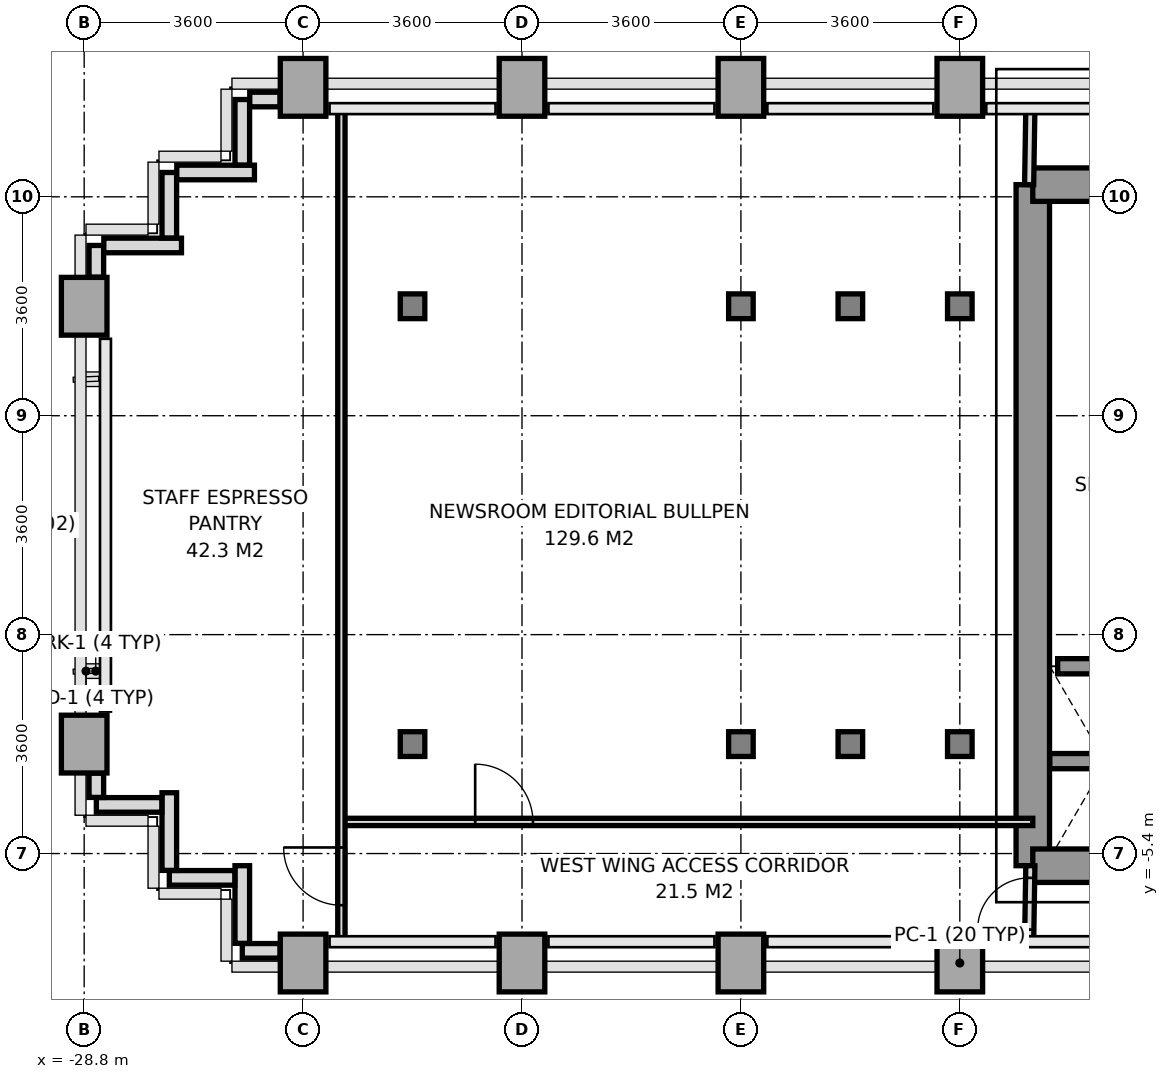
"""IFC4 building model, lengths in metres.
Left out: names, types, materials, properties, quantities, classifications, styles, units other than length and angle.
Written with IfcOpenShell. Run it as: python <this file> out.ifc"""

import sys

from ifc_helpers import new_model, si_unit, direction, frame, frame_2d, origin, origin_2d, place, context, subcontext, project, spatial, rectangle, i_section, extrude, source, transform, mapped, element, fill, save


model = new_model("IFC4")
c1 = context("Model", 3, precision=1e-05, world=origin(), true_north=direction((0.0, 1.0)))
c2 = subcontext(c1, "Body", "Model", "MODEL_VIEW")
j1 = project(units=[si_unit("LENGTHUNIT", "METRE"), si_unit("PLANEANGLEUNIT", "RADIAN")], contexts=[c1])
p1 = place(None, origin())
s1 = spatial("IfcSite", under=j1, at=p1, CompositionType="ELEMENT")
p2 = place(p1, origin())
s2 = spatial("IfcBuilding", under=s1, at=p2, CompositionType="ELEMENT")
p3 = place(p2, frame((0.0, 0.0, 37.4)))
s3 = spatial("IfcBuildingStorey", under=s2, at=p3, CompositionType="ELEMENT", Elevation=37.4)
m1 = source(origin(), c2, "Body", "SweptSolid", [
    extrude(rectangle(XDim=0.75, YDim=0.95, at=origin_2d()), origin(), (0.0, 0.0, 1.0), 3.2),
])
for number, where, z_axis, x_axis in (
    (1, (-28.8, -3.6, 0.0), (0.0, 0.0, 1.0), (1.0, 0.0, 0.0)),
    (2, (-28.8, 3.6, 0.0), (0.0, 0.0, 1.0), (1.0, 0.0, 0.0)),
    (3, (-25.2, -7.2, 0.0), (0.0, 0.0, 1.0), (1.0, 0.0, 0.0)),
    (4, (-25.2, 7.2, 0.0), (0.0, 0.0, 1.0), (1.0, 0.0, 0.0)),
):
    element("IfcColumn", number, at=place(p3, frame(where, z_axis=z_axis, x_axis=x_axis)), inside=s3, PredefinedType="COLUMN", context=c2, shape_type="MappedRepresentation", body=[
        mapped(m1, transform((0.0, 0.0, 0.0), x_axis=(1.0, 0.0, 0.0), y_axis=(0.0, 1.0, 0.0), z_axis=(0.0, 0.0, 1.0), scale=1.0)),
    ])
m2 = source(origin(), c2, "Body", "SweptSolid", [
    extrude(i_section(OverallWidth=0.404, OverallDepth=0.407, WebThickness=0.022, FlangeThickness=0.035, at=origin_2d()), origin(), (0.0, 0.0, 1.0), 3.2),
])
for number, where, z_axis, x_axis in (
    (5, (-23.4, -3.6, 0.0), (0.0, 0.0, 1.0), (1.0, 0.0, 0.0)),
    (6, (-23.4, 3.6, 0.0), (0.0, 0.0, 1.0), (1.0, 0.0, 0.0)),
):
    element("IfcColumn", number, at=place(p3, frame(where, z_axis=z_axis, x_axis=x_axis)), inside=s3, PredefinedType="COLUMN", context=c2, shape_type="MappedRepresentation", body=[
        mapped(m2, transform((0.0, 0.0, 0.0), x_axis=(1.0, 0.0, 0.0), y_axis=(0.0, 1.0, 0.0), z_axis=(0.0, 0.0, 1.0), scale=1.0)),
    ])
for number, where, z_axis, x_axis in (
    (7, (-21.6, -7.2, 0.0), (0.0, 0.0, 1.0), (1.0, 0.0, 0.0)),
    (8, (-21.6, 7.2, 0.0), (0.0, 0.0, 1.0), (1.0, 0.0, 0.0)),
    (9, (-18.0, -7.2, 0.0), (0.0, 0.0, 1.0), (1.0, 0.0, 0.0)),
):
    element("IfcColumn", number, at=place(p3, frame(where, z_axis=z_axis, x_axis=x_axis)), inside=s3, PredefinedType="COLUMN", context=c2, shape_type="MappedRepresentation", body=[
        mapped(m1, transform((0.0, 0.0, 0.0), x_axis=(1.0, 0.0, 0.0), y_axis=(0.0, 1.0, 0.0), z_axis=(0.0, 0.0, 1.0), scale=1.0)),
    ])
for number, where, z_axis, x_axis in (
    (10, (-18.0, -3.6, 0.0), (0.0, 0.0, 1.0), (1.0, 0.0, 0.0)),
    (11, (-18.0, 3.6, 0.0), (0.0, 0.0, 1.0), (1.0, 0.0, 0.0)),
):
    element("IfcColumn", number, at=place(p3, frame(where, z_axis=z_axis, x_axis=x_axis)), inside=s3, PredefinedType="COLUMN", context=c2, shape_type="MappedRepresentation", body=[
        mapped(m2, transform((0.0, 0.0, 0.0), x_axis=(1.0, 0.0, 0.0), y_axis=(0.0, 1.0, 0.0), z_axis=(0.0, 0.0, 1.0), scale=1.0)),
    ])
p4 = place(p3, frame((-18.0, 7.2, 0.0), z_axis=(0.0, 0.0, 1.0), x_axis=(1.0, 0.0, 0.0)))
e12 = element("IfcColumn", 12, at=p4, inside=s3, PredefinedType="COLUMN", context=c2, shape_type="MappedRepresentation", body=[
    mapped(m1, transform((0.0, 0.0, 0.0), x_axis=(1.0, 0.0, 0.0), y_axis=(0.0, 1.0, 0.0), z_axis=(0.0, 0.0, 1.0), scale=1.0)),
])
for number, where, z_axis, x_axis in (
    (13, (-16.2, -3.6, 0.0), (0.0, 0.0, 1.0), (1.0, 0.0, 0.0)),
    (14, (-16.2, 3.6, 0.0), (0.0, 0.0, 1.0), (1.0, 0.0, 0.0)),
):
    element("IfcColumn", number, at=place(p3, frame(where, z_axis=z_axis, x_axis=x_axis)), inside=s3, PredefinedType="COLUMN", context=c2, shape_type="MappedRepresentation", body=[
        mapped(m2, transform((0.0, 0.0, 0.0), x_axis=(1.0, 0.0, 0.0), y_axis=(0.0, 1.0, 0.0), z_axis=(0.0, 0.0, 1.0), scale=1.0)),
    ])
p5 = place(p3, frame((-14.4, -7.2, 0.0), z_axis=(0.0, 0.0, 1.0), x_axis=(1.0, 0.0, 0.0)))
e15 = element("IfcColumn", 15, at=p5, inside=s3, PredefinedType="COLUMN", context=c2, shape_type="MappedRepresentation", body=[
    mapped(m1, transform((0.0, 0.0, 0.0), x_axis=(1.0, 0.0, 0.0), y_axis=(0.0, 1.0, 0.0), z_axis=(0.0, 0.0, 1.0), scale=1.0)),
])
for number, where, z_axis, x_axis in (
    (16, (-14.4, -3.6, 0.0), (0.0, 0.0, 1.0), (1.0, 0.0, 0.0)),
    (17, (-14.4, 3.6, 0.0), (0.0, 0.0, 1.0), (1.0, 0.0, 0.0)),
):
    element("IfcColumn", number, at=place(p3, frame(where, z_axis=z_axis, x_axis=x_axis)), inside=s3, PredefinedType="COLUMN", context=c2, shape_type="MappedRepresentation", body=[
        mapped(m2, transform((0.0, 0.0, 0.0), x_axis=(1.0, 0.0, 0.0), y_axis=(0.0, 1.0, 0.0), z_axis=(0.0, 0.0, 1.0), scale=1.0)),
    ])
p6 = place(p3, frame((-14.4, 7.2, 0.0), z_axis=(0.0, 0.0, 1.0), x_axis=(1.0, 0.0, 0.0)))
e18 = element("IfcColumn", 18, at=p6, inside=s3, PredefinedType="COLUMN", context=c2, shape_type="MappedRepresentation", body=[
    mapped(m1, transform((0.0, 0.0, 0.0), x_axis=(1.0, 0.0, 0.0), y_axis=(0.0, 1.0, 0.0), z_axis=(0.0, 0.0, 1.0), scale=1.0)),
])
p7 = place(p3, frame((-25.578, -7.0, 0.0), z_axis=(0.0, 0.0, 1.0), x_axis=(-1.0, 0.0, 0.0)))
e19 = element("IfcWall", 19, at=p7, inside=s3, PredefinedType="PARAPET", context=c2, shape_type="SweptSolid", body=[
    extrude(rectangle(XDim=0.622, YDim=0.24, at=frame_2d((0.311, 0.0))), origin(), (0.0, 0.0, 1.0), 1.15),
])
p8 = place(p3, frame((-26.2, -6.877, 0.0), z_axis=(0.0, 0.0, 1.0), x_axis=(0.0, 1.0, 0.0)))
e20 = element("IfcWall", 20, at=p8, inside=s3, PredefinedType="PARAPET", context=c2, shape_type="SweptSolid", body=[
    extrude(rectangle(XDim=1.277, YDim=0.24, at=frame_2d((0.638, 0.0))), origin(), (0.0, 0.0, 1.0), 1.15),
])
p9 = place(p3, frame((-26.323, -5.8, 0.0), z_axis=(0.0, 0.0, 1.0), x_axis=(-1.0, 0.0, 0.0)))
e21 = element("IfcWall", 21, at=p9, inside=s3, PredefinedType="PARAPET", context=c2, shape_type="SweptSolid", body=[
    extrude(rectangle(XDim=1.077, YDim=0.24, at=frame_2d((0.539, 0.0))), origin(), (0.0, 0.0, 1.0), 1.15),
])
p10 = place(p3, frame((-27.4, -5.677, 0.0), z_axis=(0.0, 0.0, 1.0), x_axis=(0.0, 1.0, 0.0)))
e22 = element("IfcWall", 22, at=p10, inside=s3, PredefinedType="PARAPET", context=c2, shape_type="SweptSolid", body=[
    extrude(rectangle(XDim=1.277, YDim=0.24, at=frame_2d((0.639, 0.0))), origin(), (0.0, 0.0, 1.0), 1.15),
])
p11 = place(p3, frame((-27.523, -4.6, 0.0), z_axis=(0.0, 0.0, 1.0), x_axis=(-1.0, 0.0, 0.0)))
e23 = element("IfcWall", 23, at=p11, inside=s3, PredefinedType="PARAPET", context=c2, shape_type="SweptSolid", body=[
    extrude(rectangle(XDim=1.077, YDim=0.24, at=frame_2d((0.539, 0.0))), origin(), (0.0, 0.0, 1.0), 1.15),
])
p12 = place(p3, frame((-28.6, -4.477, 0.0), z_axis=(0.0, 0.0, 1.0), x_axis=(0.0, 1.0, 0.0)))
e24 = element("IfcWall", 24, at=p12, inside=s3, PredefinedType="PARAPET", context=c2, shape_type="SweptSolid", body=[
    extrude(rectangle(XDim=0.399, YDim=0.24, at=frame_2d((0.2, 0.0))), origin(), (0.0, 0.0, 1.0), 1.15),
])
p13 = place(p3, frame((-28.6, 4.078, 0.0), z_axis=(0.0, 0.0, 1.0), x_axis=(0.0, 1.0, 0.0)))
e25 = element("IfcWall", 25, at=p13, inside=s3, PredefinedType="PARAPET", context=c2, shape_type="SweptSolid", body=[
    extrude(rectangle(XDim=0.522, YDim=0.24, at=frame_2d((0.261, 0.0))), origin(), (0.0, 0.0, 1.0), 1.15),
])
p14 = place(p3, frame((-28.477, 4.6, 0.0), z_axis=(0.0, 0.0, 1.0), x_axis=(1.0, 0.0, 0.0)))
e26 = element("IfcWall", 26, at=p14, inside=s3, PredefinedType="PARAPET", context=c2, shape_type="SweptSolid", body=[
    extrude(rectangle(XDim=1.277, YDim=0.24, at=frame_2d((0.639, 0.0))), origin(), (0.0, 0.0, 1.0), 1.15),
])
p15 = place(p3, frame((-27.4, 4.723, 0.0), z_axis=(0.0, 0.0, 1.0), x_axis=(0.0, 1.0, 0.0)))
e27 = element("IfcWall", 27, at=p15, inside=s3, PredefinedType="PARAPET", context=c2, shape_type="SweptSolid", body=[
    extrude(rectangle(XDim=1.077, YDim=0.24, at=frame_2d((0.539, 0.0))), origin(), (0.0, 0.0, 1.0), 1.15),
])
p16 = place(p3, frame((-27.277, 5.8, 0.0), z_axis=(0.0, 0.0, 1.0), x_axis=(1.0, 0.0, 0.0)))
e28 = element("IfcWall", 28, at=p16, inside=s3, PredefinedType="PARAPET", context=c2, shape_type="SweptSolid", body=[
    extrude(rectangle(XDim=1.277, YDim=0.24, at=frame_2d((0.639, 0.0))), origin(), (0.0, 0.0, 1.0), 1.15),
])
p17 = place(p3, frame((-26.2, 5.923, 0.0), z_axis=(0.0, 0.0, 1.0), x_axis=(0.0, 1.0, 0.0)))
e29 = element("IfcWall", 29, at=p17, inside=s3, PredefinedType="PARAPET", context=c2, shape_type="SweptSolid", body=[
    extrude(rectangle(XDim=1.077, YDim=0.24, at=frame_2d((0.539, 0.0))), origin(), (0.0, 0.0, 1.0), 1.15),
])
p18 = place(p3, frame((-26.077, 7.0, 0.0), z_axis=(0.0, 0.0, 1.0), x_axis=(1.0, 0.0, 0.0)))
e30 = element("IfcWall", 30, at=p18, inside=s3, PredefinedType="PARAPET", context=c2, shape_type="SweptSolid", body=[
    extrude(rectangle(XDim=0.499, YDim=0.24, at=frame_2d((0.25, 0.0))), origin(), (0.0, 0.0, 1.0), 1.15),
])
p19 = place(p3, frame((-13.2, -5.6, 0.0), z_axis=(0.0, 0.0, 1.0), x_axis=(0.0, 1.0, 0.0)))
e31 = element("IfcWall", 31, at=p19, inside=s3, PredefinedType="SHEAR", context=c2, shape_type="SweptSolid", body=[
    extrude(rectangle(XDim=11.2, YDim=0.55, at=frame_2d((5.6, 0.0))), origin(), (0.0, 0.0, 1.0), 3.2),
])
p20 = place(p3, frame((-13.2, 5.6, 0.0), z_axis=(0.0, 0.0, 1.0), x_axis=(1.0, 0.0, 0.0)))
e32 = element("IfcWall", 32, at=p20, inside=s3, PredefinedType="SHEAR", context=c2, shape_type="SweptSolid", body=[
    extrude(rectangle(XDim=1.819, YDim=0.55, at=frame_2d((0.909, 0.0))), origin(), (0.0, 0.0, 1.0), 3.2),
])
p21 = place(p3, frame((-13.2, -5.6, 0.0), z_axis=(0.0, 0.0, 1.0), x_axis=(1.0, 0.0, 0.0)))
e33 = element("IfcWall", 33, at=p21, inside=s3, PredefinedType="SHEAR", context=c2, shape_type="SweptSolid", body=[
    extrude(rectangle(XDim=7.8, YDim=0.55, at=frame_2d((3.9, 0.0))), origin(), (0.0, 0.0, 1.0), 3.2),
])
p22 = place(p21, frame((3.6, 0.0, 0.0)))
e34 = element("IfcOpeningElement", 34, at=p22, cuts=e33, PredefinedType="OPENING", context=c2, shape_type="SweptSolid", body=[
    extrude(rectangle(XDim=1.2, YDim=2.2, at=frame_2d((0.6, 1.1))), frame((0.0, 0.285, 0.0), z_axis=(0.0, -1.0, 0.0), x_axis=(1.0, 0.0, 0.0)), (0.0, 0.0, 1.0), 0.57),
])
p23 = place(p3, frame((-12.92, -3.88, 0.0), z_axis=(0.0, 0.0, 1.0), x_axis=(1.0, 0.0, 0.0)))
e35 = element("IfcWall", 35, at=p23, inside=s3, PredefinedType="SOLIDWALL", context=c2, shape_type="SweptSolid", body=[
    extrude(rectangle(XDim=1.84, YDim=0.25, at=frame_2d((0.92, 0.0))), origin(), (0.0, 0.0, 1.0), 3.2),
])
p24 = place(p3, frame((-12.791, -2.32, 0.0), z_axis=(0.0, 0.0, 1.0), x_axis=(1.0, 0.0, 0.0)))
e36 = element("IfcWall", 36, at=p24, inside=s3, PredefinedType="SOLIDWALL", context=c2, shape_type="SweptSolid", body=[
    extrude(rectangle(XDim=1.582, YDim=0.25, at=frame_2d((0.791, 0.0))), origin(), (0.0, 0.0, 1.0), 3.2),
])
p25 = place(p3, frame((-13.26, 5.6, 0.0), z_axis=(0.0, 0.0, 1.0), x_axis=(0.016013571389, 0.999871774545, 0.0)))
e37 = element("IfcWall", 37, at=p25, inside=s3, PredefinedType="PARTITIONING", context=c2, shape_type="SweptSolid", body=[
    extrude(rectangle(XDim=1.25, YDim=0.15, at=frame_2d((0.625, 0.0))), origin(), (0.0, 0.0, 1.0), 3.2),
])
p26 = place(p3, frame((-13.26, -6.85, 0.0), z_axis=(0.0, 0.0, 1.0), x_axis=(0.016013571389, 0.999871774545, 0.0)))
e38 = element("IfcWall", 38, at=p26, inside=s3, PredefinedType="PARTITIONING", context=c2, shape_type="SweptSolid", body=[
    extrude(rectangle(XDim=1.25, YDim=0.15, at=frame_2d((0.625, 0.0))), origin(), (0.0, 0.0, 1.0), 3.2),
])
p27 = place(p26, frame((0.2, 0.0, 0.0)))
e39 = element("IfcOpeningElement", 39, at=p27, cuts=e38, PredefinedType="OPENING", context=c2, shape_type="SweptSolid", body=[
    extrude(rectangle(XDim=0.85, YDim=2.1, at=frame_2d((0.425, 1.05))), frame((0.0, 0.085, 0.0), z_axis=(0.0, -1.0, 0.0), x_axis=(1.0, 0.0, 0.0)), (0.0, 0.0, 1.0), 0.17),
])
p28 = place(p3, frame((-24.57, -4.88, 0.0), z_axis=(0.0, 0.0, 1.0), x_axis=(1.0, 0.0, 0.0)))
e40 = element("IfcWall", 40, at=p28, inside=s3, PredefinedType="PARTITIONING", context=c2, shape_type="SweptSolid", body=[
    extrude(rectangle(XDim=11.37, YDim=0.12, at=frame_2d((5.685, 0.0))), origin(), (0.0, 0.0, 1.0), 2.7),
])
p29 = place(p28, frame((2.2, 0.0, 0.0)))
e41 = element("IfcOpeningElement", 41, at=p29, cuts=e40, PredefinedType="OPENING", context=c2, shape_type="SweptSolid", body=[
    extrude(rectangle(XDim=0.95, YDim=2.15, at=frame_2d((0.475, 1.075))), frame((0.0, 0.07, 0.0), z_axis=(0.0, -1.0, 0.0), x_axis=(1.0, 0.0, 0.0)), (0.0, 0.0, 1.0), 0.14),
])
p30 = place(p3, frame((-24.57, -6.85, 0.0), z_axis=(0.0, 0.0, 1.0), x_axis=(0.0, 1.0, 0.0)))
e42 = element("IfcWall", 42, at=p30, inside=s3, PredefinedType="PARTITIONING", context=c2, shape_type="SweptSolid", body=[
    extrude(rectangle(XDim=13.7, YDim=0.12, at=frame_2d((6.85, 0.0))), origin(), (0.0, 0.0, 1.0), 2.65),
])
p31 = place(p30, frame((0.6, 0.0, 0.0)))
e43 = element("IfcOpeningElement", 43, at=p31, cuts=e42, PredefinedType="OPENING", context=c2, shape_type="SweptSolid", body=[
    extrude(rectangle(XDim=0.95, YDim=2.15, at=frame_2d((0.475, 1.075))), frame((0.0, 0.07, 0.0), z_axis=(0.0, -1.0, 0.0), x_axis=(1.0, 0.0, 0.0)), (0.0, 0.0, 1.0), 0.14),
])
m3 = source(origin(), c2, "Body", "SweptSolid", [
    extrude(rectangle(XDim=0.95, YDim=2.15, at=frame_2d((0.475, 1.075))), frame((0.0, 0.025, 0.0), z_axis=(0.0, -1.0, 0.0), x_axis=(1.0, 0.0, 0.0)), (0.0, 0.0, 1.0), 0.05),
])
p32 = place(p29, origin())
e44 = element("IfcDoor", 44, at=p32, inside=s3, OperationType="SINGLE_SWING_LEFT", PredefinedType="DOOR", context=c2, shape_type="MappedRepresentation", body=[
    mapped(m3, transform((0.0, 0.0, 0.0), x_axis=(1.0, 0.0, 0.0), y_axis=(0.0, 1.0, 0.0), z_axis=(0.0, 0.0, 1.0), scale=1.0)),
])
fill(e41, e44)
p33 = place(p31, origin())
e45 = element("IfcDoor", 45, at=p33, inside=s3, OperationType="SINGLE_SWING_RIGHT", PredefinedType="DOOR", context=c2, shape_type="MappedRepresentation", body=[
    mapped(m3, transform((0.0, 0.0, 0.0), x_axis=(1.0, 0.0, 0.0), y_axis=(0.0, 1.0, 0.0), z_axis=(0.0, 0.0, 1.0), scale=1.0)),
])
fill(e43, e45)
m4 = source(origin(), c2, "Body", "SweptSolid", [
    extrude(rectangle(XDim=0.85, YDim=2.1, at=frame_2d((0.425, 1.05))), frame((0.0, 0.025, 0.0), z_axis=(0.0, -1.0, 0.0), x_axis=(1.0, 0.0, 0.0)), (0.0, 0.0, 1.0), 0.05),
])
p34 = place(p27, origin())
e46 = element("IfcDoor", 46, at=p34, inside=s3, OperationType="SINGLE_SWING_LEFT", PredefinedType="DOOR", context=c2, shape_type="MappedRepresentation", body=[
    mapped(m4, transform((0.0, 0.0, 0.0), x_axis=(1.0, 0.0, 0.0), y_axis=(0.0, 1.0, 0.0), z_axis=(0.0, 0.0, 1.0), scale=1.0)),
])
fill(e39, e46)
save(model, sys.argv[1])
